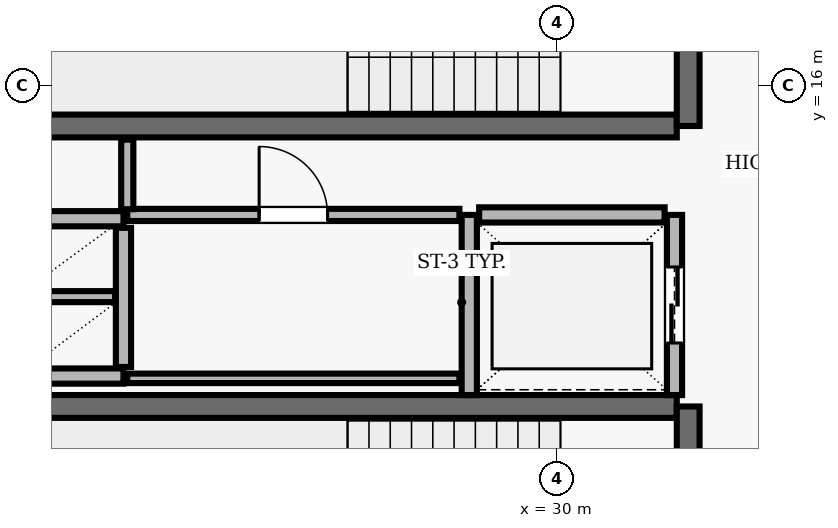
"""IFC4 building model, lengths in metres.
Left out: names, types, materials, properties, quantities, classifications, styles, units other than length and angle.
Written with IfcOpenShell. Run it as: python <this file> out.ifc"""

import sys

from ifc_helpers import new_model, si_unit, direction, frame, frame_2d, origin, place, context, subcontext, project, spatial, rectangle, extrude, element, fill, save


model = new_model("IFC4")
c1 = context("Model", 3, precision=1e-05, world=origin(), true_north=direction((0.0, 1.0)))
c2 = subcontext(c1, "Body", "Model", "MODEL_VIEW")
j1 = project(units=[si_unit("LENGTHUNIT", "METRE"), si_unit("PLANEANGLEUNIT", "RADIAN")], contexts=[c1])
p1 = place(None, origin())
s1 = spatial("IfcSite", under=j1, at=p1, CompositionType="ELEMENT")
p2 = place(p1, origin())
s2 = spatial("IfcBuilding", under=s1, at=p2, CompositionType="ELEMENT")
p3 = place(p2, frame((0.0, 0.0, 295.0)))
s3 = spatial("IfcBuildingStorey", under=s2, at=p3, CompositionType="ELEMENT", Elevation=295.0)
p4 = place(p3, frame((23.22, 15.47, 0.0), z_axis=(0.0, 0.0, 1.0), x_axis=(1.0, 0.0, 0.0)))
e1 = element("IfcWall", 1, at=p4, inside=s3, PredefinedType="SHEAR", context=c2, shape_type="SweptSolid", body=[
    extrude(rectangle(XDim=8.36, YDim=0.3, at=frame_2d((4.18, 0.0))), origin(), (0.0, 0.0, 1.0), 3.69),
])
p5 = place(p3, frame((31.73, 15.47, 0.0), z_axis=(0.0, 0.0, 1.0), x_axis=(0.0, 1.0, 0.0)))
e2 = element("IfcWall", 2, at=p5, inside=s3, PredefinedType="SHEAR", context=c2, shape_type="SweptSolid", body=[
    extrude(rectangle(XDim=3.51, YDim=0.3, at=frame_2d((1.755, 0.0))), origin(), (0.0, 0.0, 1.0), 3.69),
])
p6 = place(p5, frame((1.18, 0.0, 0.0)))
e3 = element("IfcOpeningElement", 3, at=p6, cuts=e2, PredefinedType="OPENING", context=c2, shape_type="SweptSolid", body=[
    extrude(rectangle(XDim=1.15, YDim=2.15, at=frame_2d((0.575, 1.075))), frame((0.0, 0.16, 0.0), z_axis=(0.0, -1.0, 0.0), x_axis=(1.0, 0.0, 0.0)), (0.0, 0.0, 1.0), 0.32),
])
p7 = place(p3, frame((31.58, 11.78, 0.0), z_axis=(0.0, 0.0, 1.0), x_axis=(-1.0, 0.0, 0.0)))
e4 = element("IfcWall", 4, at=p7, inside=s3, PredefinedType="SHEAR", context=c2, shape_type="SweptSolid", body=[
    extrude(rectangle(XDim=8.36, YDim=0.3, at=frame_2d((4.18, 0.0))), origin(), (0.0, 0.0, 1.0), 3.69),
])
p8 = place(p3, frame((31.73, 8.27, 0.0), z_axis=(0.0, 0.0, 1.0), x_axis=(0.0, 1.0, 0.0)))
e5 = element("IfcWall", 5, at=p8, inside=s3, PredefinedType="SHEAR", context=c2, shape_type="SweptSolid", body=[
    extrude(rectangle(XDim=3.51, YDim=0.3, at=frame_2d((1.755, 0.0))), origin(), (0.0, 0.0, 1.0), 3.69),
])
p9 = place(p8, frame((1.18, 0.0, 0.0)))
e6 = element("IfcOpeningElement", 6, at=p9, cuts=e5, PredefinedType="OPENING", context=c2, shape_type="SweptSolid", body=[
    extrude(rectangle(XDim=1.15, YDim=2.15, at=frame_2d((0.575, 1.075))), frame((0.0, 0.16, 0.0), z_axis=(0.0, -1.0, 0.0), x_axis=(1.0, 0.0, 0.0)), (0.0, 0.0, 1.0), 0.32),
])
p10 = place(p3, frame((28.85, 14.3, 0.0), z_axis=(0.0, 0.0, 1.0), x_axis=(0.0, -1.0, 0.0)))
e7 = element("IfcWall", 7, at=p10, inside=s3, PredefinedType="SOLIDWALL", context=c2, shape_type="SweptSolid", body=[
    extrude(rectangle(XDim=2.37, YDim=0.2, at=frame_2d((1.185, 0.0))), origin(), (0.0, 0.0, 1.0), 3.69),
])
p11 = place(p3, frame((31.55, 11.93, 0.0), z_axis=(0.0, 0.0, 1.0), x_axis=(0.0, 1.0, 0.0)))
e8 = element("IfcWall", 8, at=p11, inside=s3, PredefinedType="SOLIDWALL", context=c2, shape_type="SweptSolid", body=[
    extrude(rectangle(XDim=2.37, YDim=0.2, at=frame_2d((1.185, 0.0))), origin(), (0.0, 0.0, 1.0), 3.69),
])
p12 = place(p11, frame((0.685, 0.0, 0.0)))
e9 = element("IfcOpeningElement", 9, at=p12, cuts=e8, PredefinedType="OPENING", context=c2, shape_type="SweptSolid", body=[
    extrude(rectangle(XDim=1.0, YDim=2.1, at=frame_2d((0.5, 1.05))), frame((0.0, 0.11, 0.0), z_axis=(0.0, -1.0, 0.0), x_axis=(1.0, 0.0, 0.0)), (0.0, 0.0, 1.0), 0.22),
])
p13 = place(p3, frame((31.42, 14.3, 0.0), z_axis=(0.0, 0.0, 1.0), x_axis=(-1.0, 0.0, 0.0)))
e10 = element("IfcWall", 10, at=p13, inside=s3, PredefinedType="SOLIDWALL", context=c2, shape_type="SweptSolid", body=[
    extrude(rectangle(XDim=2.44, YDim=0.2, at=frame_2d((1.22, 0.0))), origin(), (0.0, 0.0, 1.0), 3.69),
])
for number, where, z_axis, x_axis in (
    (11, (22.9, 14.25, 0.0), (0.0, 0.0, 1.0), (1.0, 0.0, 0.0)),
    (12, (22.9, 12.18, 0.0), (0.0, 0.0, 1.0), (1.0, 0.0, 0.0)),
):
    element("IfcWall", number, at=place(p3, frame(where, z_axis=z_axis, x_axis=x_axis)), inside=s3, PredefinedType="SOLIDWALL", context=c2, shape_type="SweptSolid", body=[
        extrude(rectangle(XDim=1.4, YDim=0.2, at=frame_2d((0.7, 0.0))), origin(), (0.0, 0.0, 1.0), 3.69),
    ])
p14 = place(p3, frame((24.3, 12.3, 0.0), z_axis=(0.0, 0.0, 1.0), x_axis=(0.0, 1.0, 0.0)))
e13 = element("IfcWall", 13, at=p14, inside=s3, PredefinedType="SOLIDWALL", context=c2, shape_type="SweptSolid", body=[
    extrude(rectangle(XDim=1.83, YDim=0.2, at=frame_2d((0.915, 0.0))), origin(), (0.0, 0.0, 1.0), 3.69),
])
p15 = place(p3, frame((23.01, 13.225, 0.0), z_axis=(0.0, 0.0, 1.0), x_axis=(1.0, 0.0, 0.0)))
e14 = element("IfcWall", 14, at=p15, inside=s3, PredefinedType="PARTITIONING", context=c2, shape_type="SweptSolid", body=[
    extrude(rectangle(XDim=1.18, YDim=0.145, at=frame_2d((0.59, 0.0))), origin(), (0.0, 0.0, 1.0), 3.69),
])
p16 = place(p3, frame((24.35, 12.15, 0.0), z_axis=(0.0, 0.0, 1.0), x_axis=(1.0, 0.0, 0.0)))
e15 = element("IfcWall", 15, at=p16, inside=s3, PredefinedType="PARTITIONING", context=c2, shape_type="SweptSolid", body=[
    extrude(rectangle(XDim=4.37, YDim=0.125, at=frame_2d((2.185, 0.0))), origin(), (0.0, 0.0, 1.0), 3.69),
])
p17 = place(p3, frame((24.35, 14.3, 0.0), z_axis=(0.0, 0.0, 1.0), x_axis=(1.0, 0.0, 0.0)))
e16 = element("IfcWall", 16, at=p17, inside=s3, PredefinedType="PARTITIONING", context=c2, shape_type="SweptSolid", body=[
    extrude(rectangle(XDim=4.37, YDim=0.16, at=frame_2d((2.185, 0.0))), origin(), (0.0, 0.0, 1.0), 3.69),
])
p18 = place(p17, frame((1.735, 0.0, 0.0)))
e17 = element("IfcOpeningElement", 17, at=p18, cuts=e16, PredefinedType="OPENING", context=c2, shape_type="SweptSolid", body=[
    extrude(rectangle(XDim=0.9, YDim=2.1, at=frame_2d((0.45, 1.05))), frame((0.0, 0.09, 0.0), z_axis=(0.0, -1.0, 0.0), x_axis=(1.0, 0.0, 0.0)), (0.0, 0.0, 1.0), 0.18),
])
p19 = place(p3, frame((24.35, 15.29, 0.0), z_axis=(0.0, 0.0, 1.0), x_axis=(0.0, -1.0, 0.0)))
e18 = element("IfcWall", 18, at=p19, inside=s3, PredefinedType="PARTITIONING", context=c2, shape_type="SweptSolid", body=[
    extrude(rectangle(XDim=0.915, YDim=0.16, at=frame_2d((0.458, 0.0))), origin(), (0.0, 0.0, 1.0), 3.69),
])
p20 = place(p12, origin())
e19 = element("IfcDoor", 19, at=p20, inside=s3, OperationType="DOUBLE_DOOR_SLIDING", PredefinedType="DOOR", context=c2, shape_type="SweptSolid", body=[
    extrude(rectangle(XDim=1.0, YDim=2.1, at=frame_2d((0.5, 1.05))), frame((0.0, 0.025, 0.0), z_axis=(0.0, -1.0, 0.0), x_axis=(1.0, 0.0, 0.0)), (0.0, 0.0, 1.0), 0.05),
])
fill(e9, e19)
p21 = place(p18, origin())
e20 = element("IfcDoor", 20, at=p21, inside=s3, OperationType="SINGLE_SWING_LEFT", PredefinedType="DOOR", context=c2, shape_type="SweptSolid", body=[
    extrude(rectangle(XDim=0.9, YDim=2.1, at=frame_2d((0.45, 1.05))), frame((0.0, 0.025, 0.0), z_axis=(0.0, -1.0, 0.0), x_axis=(1.0, 0.0, 0.0)), (0.0, 0.0, 1.0), 0.05),
])
fill(e17, e20)
save(model, sys.argv[1])
